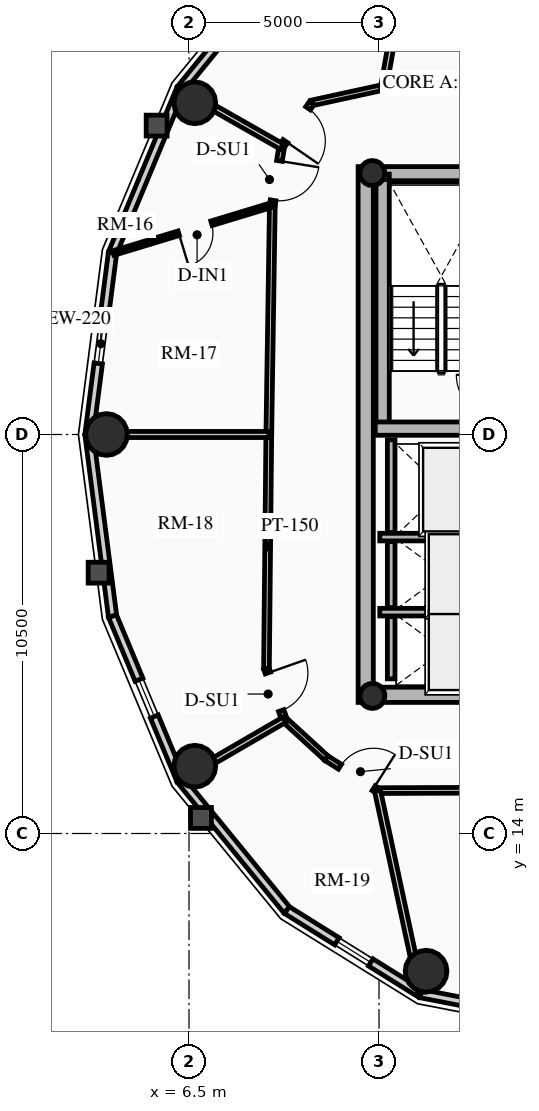
"""IFC4 building model, lengths in metres.
Left out: names, types, materials, properties, quantities, classifications, styles, units other than length and angle.
Written with IfcOpenShell. Run it as: python <this file> out.ifc"""

import sys

from ifc_helpers import new_model, si_unit, direction, frame, frame_2d, origin, origin_2d, place, context, subcontext, project, spatial, rectangle, circle, hollow_circle, extrude, source, transform, mapped, element, fill, save


model = new_model("IFC4")
c1 = context("Model", 3, precision=1e-05, world=origin(), true_north=direction((0.0, 1.0)))
c2 = subcontext(c1, "Body", "Model", "MODEL_VIEW")
j1 = project(units=[si_unit("LENGTHUNIT", "METRE"), si_unit("PLANEANGLEUNIT", "RADIAN")], contexts=[c1])
p1 = place(None, origin())
s1 = spatial("IfcSite", under=j1, at=p1, CompositionType="ELEMENT")
p2 = place(p1, origin())
s2 = spatial("IfcBuilding", under=s1, at=p2, CompositionType="ELEMENT")
p3 = place(p2, frame((0.0, 0.0, 205.39)))
s3 = spatial("IfcBuildingStorey", under=s2, at=p3, CompositionType="ELEMENT", Elevation=205.39)
p4 = place(p3, frame((11.15, 17.45, 0.0), z_axis=(0.0, 0.0, 1.0), x_axis=(0.0, 1.0, 0.0)))
e1 = element("IfcWall", 1, at=p4, inside=s3, PredefinedType="SHEAR", context=c2, shape_type="SweptSolid", body=[
    extrude(rectangle(XDim=14.1, YDim=0.4, at=frame_2d((7.05, 0.0))), origin(), (0.0, 0.0, 1.0), 2.91),
])
p5 = place(p3, frame((11.15, 17.65, 0.0), z_axis=(0.0, 0.0, 1.0), x_axis=(1.0, 0.0, 0.0)))
e2 = element("IfcWall", 2, at=p5, inside=s3, PredefinedType="SHEAR", context=c2, shape_type="SweptSolid", body=[
    extrude(rectangle(XDim=10.7, YDim=0.4, at=frame_2d((5.35, 0.0))), origin(), (0.0, 0.0, 1.0), 2.91),
])
m1 = source(origin(), c2, "Body", "SweptSolid", [
    extrude(rectangle(XDim=1.5, YDim=2.02, at=frame_2d((0.75, 1.01))), frame((0.0, 0.21, 0.0), z_axis=(0.0, -1.0, 0.0), x_axis=(1.0, 0.0, 0.0)), (0.0, 0.0, 1.0), 0.42),
])
p6 = place(p5, frame((5.45, 0.0, 0.0)))
e3 = element("IfcOpeningElement", 3, at=p6, cuts=e2, PredefinedType="OPENING", context=c2, shape_type="MappedRepresentation", body=[
    mapped(m1, transform((0.0, 0.0, 0.0), x_axis=(1.0, 0.0, 0.0), y_axis=(0.0, 1.0, 0.0), z_axis=(0.0, 0.0, 1.0), scale=1.0)),
])
p7 = place(p3, frame((11.15, 31.35, 0.0), z_axis=(0.0, 0.0, 1.0), x_axis=(1.0, 0.0, 0.0)))
e4 = element("IfcWall", 4, at=p7, inside=s3, PredefinedType="SHEAR", context=c2, shape_type="SweptSolid", body=[
    extrude(rectangle(XDim=10.7, YDim=0.4, at=frame_2d((5.35, 0.0))), origin(), (0.0, 0.0, 1.0), 2.91),
])
p8 = place(p7, frame((4.6, 0.0, 0.0)))
e5 = element("IfcOpeningElement", 5, at=p8, cuts=e4, PredefinedType="OPENING", context=c2, shape_type="MappedRepresentation", body=[
    mapped(m1, transform((0.0, 0.0, 0.0), x_axis=(1.0, 0.0, 0.0), y_axis=(0.0, 1.0, 0.0), z_axis=(0.0, 0.0, 1.0), scale=1.0)),
])
p9 = place(p3, frame((11.595, 24.655, 0.0), z_axis=(0.0, 0.0, 1.0), x_axis=(0.0, 1.0, 0.0)))
e6 = element("IfcWall", 6, at=p9, inside=s3, PredefinedType="SHEAR", context=c2, shape_type="SweptSolid", body=[
    extrude(rectangle(XDim=6.695, YDim=0.35, at=frame_2d((3.348, 0.0))), origin(), (0.0, 0.0, 1.0), 2.91),
])
p10 = place(p3, frame((11.4, 24.655, 0.0), z_axis=(0.0, 0.0, 1.0), x_axis=(1.0, 0.0, 0.0)))
e7 = element("IfcWall", 7, at=p10, inside=s3, PredefinedType="SHEAR", context=c2, shape_type="SweptSolid", body=[
    extrude(rectangle(XDim=3.285, YDim=0.35, at=frame_2d((1.643, 0.0))), origin(), (0.0, 0.0, 1.0), 2.91),
])
for number, where, z_axis, x_axis in (
    (8, (11.325, 17.62, 0.0), (0.0, 0.0, 1.0), (1.0, 0.0, 0.0)),
    (9, (11.325, 31.38, 0.0), (0.0, 0.0, 1.0), (1.0, 0.0, 0.0)),
):
    element("IfcColumn", number, at=place(p3, frame(where, z_axis=z_axis, x_axis=x_axis)), inside=s3, PredefinedType="COLUMN", context=c2, shape_type="SweptSolid", body=[
        extrude(hollow_circle(Radius=0.33, WallThickness=0.025, at=origin_2d()), origin(), (0.0, 0.0, 1.0), 2.91),
    ])
for number, where, z_axis, x_axis in (
    (10, (6.653, 33.229, 0.0), (0.0, 0.0, 1.0), (1.0, 0.0, 0.0)),
    (11, (4.328, 24.5, 0.0), (0.0, 0.0, 1.0), (1.0, 0.0, 0.0)),
    (12, (6.653, 15.771, 0.0), (0.0, 0.0, 1.0), (1.0, 0.0, 0.0)),
    (13, (12.739, 10.377, 0.0), (0.0, 0.0, 1.0), (1.0, 0.0, 0.0)),
):
    element("IfcColumn", number, at=place(p3, frame(where, z_axis=z_axis, x_axis=x_axis)), inside=s3, PredefinedType="USERDEFINED", context=c2, shape_type="SweptSolid", body=[
        extrude(circle(Radius=0.55, at=origin_2d()), origin(), (0.0, 0.0, 1.0), 2.91),
    ])
p11 = place(p3, frame((6.282, 33.593, 0.0), z_axis=(0.0, 0.0, 1.0), x_axis=(0.632467166636, 0.774587169483, 0.0)))
e14 = element("IfcWall", 14, at=p11, inside=s3, PredefinedType="SOLIDWALL", context=c2, shape_type="SweptSolid", body=[
    extrude(rectangle(XDim=4.418, YDim=0.22, at=frame_2d((2.209, 0.0))), origin(), (0.0, 0.0, 1.0), 2.322),
])
m2 = source(origin(), c2, "Body", "SweptSolid", [
    extrude(rectangle(XDim=1.05, YDim=1.3, at=frame_2d((0.525, 0.65))), frame((0.0, 0.12, 0.0), z_axis=(0.0, -1.0, 0.0), x_axis=(1.0, 0.0, 0.0)), (0.0, 0.0, 1.0), 0.24),
])
p12 = place(p11, frame((1.684, 0.0, 0.65)))
e15 = element("IfcOpeningElement", 15, at=p12, cuts=e14, PredefinedType="OPENING", context=c2, shape_type="MappedRepresentation", body=[
    mapped(m2, transform((0.0, 0.0, 0.0), x_axis=(1.0, 0.0, 0.0), y_axis=(0.0, 1.0, 0.0), z_axis=(0.0, 0.0, 1.0), scale=1.0)),
])
p13 = place(p3, frame((4.488, 29.281, 0.0), z_axis=(0.0, 0.0, 1.0), x_axis=(0.384036305194, 0.923317993052, 0.0)))
e16 = element("IfcWall", 16, at=p13, inside=s3, PredefinedType="SOLIDWALL", context=c2, shape_type="SweptSolid", body=[
    extrude(rectangle(XDim=4.671, YDim=0.22, at=frame_2d((2.335, 0.0))), origin(), (0.0, 0.0, 1.0), 2.322),
])
p14 = place(p3, frame((3.87, 24.5, 0.0), z_axis=(0.0, 0.0, 1.0), x_axis=(0.128241318541, 0.991742993027, 0.0)))
e17 = element("IfcWall", 17, at=p14, inside=s3, PredefinedType="SOLIDWALL", context=c2, shape_type="SweptSolid", body=[
    extrude(rectangle(XDim=4.82, YDim=0.22, at=frame_2d((2.41, 0.0))), origin(), (0.0, 0.0, 1.0), 2.322),
])
p15 = place(p14, frame((1.885, 0.0, 0.65)))
e18 = element("IfcOpeningElement", 18, at=p15, cuts=e17, PredefinedType="OPENING", context=c2, shape_type="MappedRepresentation", body=[
    mapped(m2, transform((0.0, 0.0, 0.0), x_axis=(1.0, 0.0, 0.0), y_axis=(0.0, 1.0, 0.0), z_axis=(0.0, 0.0, 1.0), scale=1.0)),
])
p16 = place(p3, frame((4.488, 19.719, 0.0), z_axis=(0.0, 0.0, 1.0), x_axis=(-0.128241318541, 0.991742993027, 0.0)))
e19 = element("IfcWall", 19, at=p16, inside=s3, PredefinedType="SOLIDWALL", context=c2, shape_type="SweptSolid", body=[
    extrude(rectangle(XDim=4.82, YDim=0.22, at=frame_2d((2.41, 0.0))), origin(), (0.0, 0.0, 1.0), 2.322),
])
p17 = place(p3, frame((6.282, 15.407, 0.0), z_axis=(0.0, 0.0, 1.0), x_axis=(-0.384036305194, 0.923317993052, 0.0)))
e20 = element("IfcWall", 20, at=p17, inside=s3, PredefinedType="SOLIDWALL", context=c2, shape_type="SweptSolid", body=[
    extrude(rectangle(XDim=4.671, YDim=0.22, at=frame_2d((2.335, 0.0))), origin(), (0.0, 0.0, 1.0), 2.322),
])
p18 = place(p17, frame((1.81, 0.0, 0.65)))
e21 = element("IfcOpeningElement", 21, at=p18, cuts=e20, PredefinedType="OPENING", context=c2, shape_type="MappedRepresentation", body=[
    mapped(m2, transform((0.0, 0.0, 0.0), x_axis=(1.0, 0.0, 0.0), y_axis=(0.0, 1.0, 0.0), z_axis=(0.0, 0.0, 1.0), scale=1.0)),
])
p19 = place(p3, frame((9.076, 11.985, 0.0), z_axis=(0.0, 0.0, 1.0), x_axis=(-0.632467166636, 0.774587169483, 0.0)))
e22 = element("IfcWall", 22, at=p19, inside=s3, PredefinedType="SOLIDWALL", context=c2, shape_type="SweptSolid", body=[
    extrude(rectangle(XDim=4.418, YDim=0.22, at=frame_2d((2.209, 0.0))), origin(), (0.0, 0.0, 1.0), 2.322),
])
p20 = place(p3, frame((12.597, 9.787, 0.0), z_axis=(0.0, 0.0, 1.0), x_axis=(-0.848318713376, 0.529485939886, 0.0)))
e23 = element("IfcWall", 23, at=p20, inside=s3, PredefinedType="SOLIDWALL", context=c2, shape_type="SweptSolid", body=[
    extrude(rectangle(XDim=4.15, YDim=0.22, at=frame_2d((2.075, 0.0))), origin(), (0.0, 0.0, 1.0), 2.322),
])
p21 = place(p20, frame((1.55, 0.0, 0.65)))
e24 = element("IfcOpeningElement", 24, at=p21, cuts=e23, PredefinedType="OPENING", context=c2, shape_type="MappedRepresentation", body=[
    mapped(m2, transform((0.0, 0.0, 0.0), x_axis=(1.0, 0.0, 0.0), y_axis=(0.0, 1.0, 0.0), z_axis=(0.0, 0.0, 1.0), scale=1.0)),
])
p22 = place(p3, frame((16.5, 9.03, 0.0), z_axis=(0.0, 0.0, 1.0), x_axis=(-0.981700307484, 0.190432419211, 0.0)))
e25 = element("IfcWall", 25, at=p22, inside=s3, PredefinedType="SOLIDWALL", context=c2, shape_type="SweptSolid", body=[
    extrude(rectangle(XDim=3.976, YDim=0.22, at=frame_2d((1.988, 0.0))), origin(), (0.0, 0.0, 1.0), 2.322),
])
p23 = place(p22, frame((1.463, 0.0, 0.65)))
e26 = element("IfcOpeningElement", 26, at=p23, cuts=e25, PredefinedType="OPENING", context=c2, shape_type="MappedRepresentation", body=[
    mapped(m2, transform((0.0, 0.0, 0.0), x_axis=(1.0, 0.0, 0.0), y_axis=(0.0, 1.0, 0.0), z_axis=(0.0, 0.0, 1.0), scale=1.0)),
])
p24 = place(p3, frame((11.52, 21.8, 0.0), z_axis=(0.0, 0.0, 1.0), x_axis=(1.0, 0.0, 0.0)))
e27 = element("IfcWall", 27, at=p24, inside=s3, PredefinedType="SHEAR", context=c2, shape_type="SweptSolid", body=[
    extrude(rectangle(XDim=2.97, YDim=0.2, at=frame_2d((1.485, 0.0))), origin(), (0.0, 0.0, 1.0), 2.91),
])
p25 = place(p3, frame((11.82, 21.92, 0.0), z_axis=(0.0, 0.0, 1.0), x_axis=(0.0, 1.0, 0.0)))
e28 = element("IfcWall", 28, at=p25, inside=s3, PredefinedType="SHEAR", context=c2, shape_type="SweptSolid", body=[
    extrude(rectangle(XDim=2.44, YDim=0.2, at=frame_2d((1.22, 0.0))), origin(), (0.0, 0.0, 1.0), 2.91),
])
p26 = place(p3, frame((11.52, 19.825, 0.0), z_axis=(0.0, 0.0, 1.0), x_axis=(1.0, 0.0, 0.0)))
e29 = element("IfcWall", 29, at=p26, inside=s3, PredefinedType="SHEAR", context=c2, shape_type="SweptSolid", body=[
    extrude(rectangle(XDim=2.97, YDim=0.2, at=frame_2d((1.485, 0.0))), origin(), (0.0, 0.0, 1.0), 2.91),
])
p27 = place(p3, frame((11.82, 19.945, 0.0), z_axis=(0.0, 0.0, 1.0), x_axis=(0.0, 1.0, 0.0)))
e30 = element("IfcWall", 30, at=p27, inside=s3, PredefinedType="SHEAR", context=c2, shape_type="SweptSolid", body=[
    extrude(rectangle(XDim=1.735, YDim=0.2, at=frame_2d((0.867, 0.0))), origin(), (0.0, 0.0, 1.0), 2.91),
])
p28 = place(p3, frame((11.82, 18.07, 0.0), z_axis=(0.0, 0.0, 1.0), x_axis=(0.0, 1.0, 0.0)))
e31 = element("IfcWall", 31, at=p28, inside=s3, PredefinedType="SHEAR", context=c2, shape_type="SweptSolid", body=[
    extrude(rectangle(XDim=1.635, YDim=0.2, at=frame_2d((0.817, 0.0))), origin(), (0.0, 0.0, 1.0), 2.91),
])
p29 = place(p3, frame((18.143, 33.86, 0.0), z_axis=(0.0, 0.0, 1.0), x_axis=(-0.999419208319, -0.034077060363, 0.0)))
e32 = element("IfcWall", 32, at=p29, inside=s3, PredefinedType="PARTITIONING", context=c2, shape_type="SweptSolid", body=[
    extrude(rectangle(XDim=6.527, YDim=0.15, at=frame_2d((3.263, 0.0))), origin(), (0.0, 0.0, 1.0), 2.255),
])
p30 = place(p3, frame((11.62, 33.637, 0.0), z_axis=(0.0, 0.0, 1.0), x_axis=(-0.97702579435, -0.213121085711, 0.0)))
e33 = element("IfcWall", 33, at=p30, inside=s3, PredefinedType="PARTITIONING", context=c2, shape_type="SweptSolid", body=[
    extrude(rectangle(XDim=1.935, YDim=0.15, at=frame_2d((0.967, 0.0))), origin(), (0.0, 0.0, 1.0), 2.255),
])
p31 = place(p3, frame((9.729, 33.225, 0.0), z_axis=(0.0, 0.0, 1.0), x_axis=(-0.567183649484, -0.82359134755, 0.0)))
e34 = element("IfcWall", 34, at=p31, inside=s3, PredefinedType="PARTITIONING", context=c2, shape_type="SweptSolid", body=[
    extrude(rectangle(XDim=1.392, YDim=0.15, at=frame_2d((0.696, 0.0))), origin(), (0.0, 0.0, 1.0), 2.322),
])
m3 = source(origin(), c2, "Body", "SweptSolid", [
    extrude(rectangle(XDim=1.05, YDim=2.015, at=frame_2d((0.525, 1.007))), frame((0.0, 0.085, 0.0), z_axis=(0.0, -1.0, 0.0), x_axis=(1.0, 0.0, 0.0)), (0.0, 0.0, 1.0), 0.17),
])
p32 = place(p31, frame((0.171, 0.0, 0.0)))
e35 = element("IfcOpeningElement", 35, at=p32, cuts=e34, PredefinedType="OPENING", context=c2, shape_type="MappedRepresentation", body=[
    mapped(m3, transform((0.0, 0.0, 0.0), x_axis=(1.0, 0.0, 0.0), y_axis=(0.0, 1.0, 0.0), z_axis=(0.0, 0.0, 1.0), scale=1.0)),
])
p33 = place(p3, frame((8.94, 32.078, 0.0), z_axis=(0.0, 0.0, 1.0), x_axis=(-0.159148467753, -0.98725466077, 0.0)))
e36 = element("IfcWall", 36, at=p33, inside=s3, PredefinedType="PARTITIONING", context=c2, shape_type="SweptSolid", body=[
    extrude(rectangle(XDim=1.554, YDim=0.15, at=frame_2d((0.777, 0.0))), origin(), (0.0, 0.0, 1.0), 2.255),
])
p34 = place(p33, frame((0.384, 0.0, 0.0)))
e37 = element("IfcOpeningElement", 37, at=p34, cuts=e36, PredefinedType="OPENING", context=c2, shape_type="MappedRepresentation", body=[
    mapped(m3, transform((0.0, 0.0, 0.0), x_axis=(1.0, 0.0, 0.0), y_axis=(0.0, 1.0, 0.0), z_axis=(0.0, 0.0, 1.0), scale=1.0)),
])
p35 = place(p3, frame((8.693, 30.544, 0.0), z_axis=(0.0, 0.0, 1.0), x_axis=(-0.015307007986, -0.99988284089, 0.0)))
e38 = element("IfcWall", 38, at=p35, inside=s3, PredefinedType="PARTITIONING", context=c2, shape_type="SweptSolid", body=[
    extrude(rectangle(XDim=6.045, YDim=0.15, at=frame_2d((3.022, 0.0))), origin(), (0.0, 0.0, 1.0), 2.255),
])
p36 = place(p3, frame((8.6, 24.5, 0.0), z_axis=(0.0, 0.0, 1.0), x_axis=(-0.010023665349, -0.999949761805, 0.0)))
e39 = element("IfcWall", 39, at=p36, inside=s3, PredefinedType="PARTITIONING", context=c2, shape_type="SweptSolid", body=[
    extrude(rectangle(XDim=6.162, YDim=0.15, at=frame_2d((3.081, 0.0))), origin(), (0.0, 0.0, 1.0), 2.255),
])
p37 = place(p3, frame((8.538, 18.338, 0.0), z_axis=(0.0, 0.0, 1.0), x_axis=(0.331358150167, -0.94350504838, 0.0)))
e40 = element("IfcWall", 40, at=p37, inside=s3, PredefinedType="PARTITIONING", context=c2, shape_type="SweptSolid", body=[
    extrude(rectangle(XDim=1.424, YDim=0.15, at=frame_2d((0.712, 0.0))), origin(), (0.0, 0.0, 1.0), 2.255),
])
p38 = place(p37, frame((0.12, 0.0, 0.0)))
e41 = element("IfcOpeningElement", 41, at=p38, cuts=e40, PredefinedType="OPENING", context=c2, shape_type="MappedRepresentation", body=[
    mapped(m3, transform((0.0, 0.0, 0.0), x_axis=(1.0, 0.0, 0.0), y_axis=(0.0, 1.0, 0.0), z_axis=(0.0, 0.0, 1.0), scale=1.0)),
])
p39 = place(p3, frame((9.01, 16.994, 0.0), z_axis=(0.0, 0.0, 1.0), x_axis=(0.737701798986, -0.67512669609, 0.0)))
e42 = element("IfcWall", 42, at=p39, inside=s3, PredefinedType="PARTITIONING", context=c2, shape_type="SweptSolid", body=[
    extrude(rectangle(XDim=1.498, YDim=0.15, at=frame_2d((0.749, 0.0))), origin(), (0.0, 0.0, 1.0), 2.322),
])
p40 = place(p3, frame((10.115, 15.983, 0.0), z_axis=(0.0, 0.0, 1.0), x_axis=(0.843995849351, -0.536349705209, 0.0)))
e43 = element("IfcWall", 43, at=p40, inside=s3, PredefinedType="PARTITIONING", context=c2, shape_type="SweptSolid", body=[
    extrude(rectangle(XDim=1.593, YDim=0.15, at=frame_2d((0.796, 0.0))), origin(), (0.0, 0.0, 1.0), 2.255),
])
p41 = place(p40, frame((0.423, 0.0, 0.0)))
e44 = element("IfcOpeningElement", 44, at=p41, cuts=e43, PredefinedType="OPENING", context=c2, shape_type="MappedRepresentation", body=[
    mapped(m3, transform((0.0, 0.0, 0.0), x_axis=(1.0, 0.0, 0.0), y_axis=(0.0, 1.0, 0.0), z_axis=(0.0, 0.0, 1.0), scale=1.0)),
])
p42 = place(p3, frame((11.46, 15.129, 0.0), z_axis=(0.0, 0.0, 1.0), x_axis=(0.999993513287, 0.003601858435, 0.0)))
e45 = element("IfcWall", 45, at=p42, inside=s3, PredefinedType="PARTITIONING", context=c2, shape_type="SweptSolid", body=[
    extrude(rectangle(XDim=3.321, YDim=0.15, at=frame_2d((1.661, 0.0))), origin(), (0.0, 0.0, 1.0), 2.322),
])
p43 = place(p3, frame((11.62, 33.637, 0.0), z_axis=(0.0, 0.0, 1.0), x_axis=(0.174269061361, 0.984698072636, 0.0)))
e46 = element("IfcWall", 46, at=p43, inside=s3, PredefinedType="PARTITIONING", context=c2, shape_type="SweptSolid", body=[
    extrude(rectangle(XDim=5.643, YDim=0.16, at=frame_2d((2.822, 0.0))), origin(), (0.0, 0.0, 1.0), 2.322),
])
p44 = place(p3, frame((8.94, 32.078, 0.0), z_axis=(0.0, 0.0, 1.0), x_axis=(-0.869170975588, 0.494511693689, 0.0)))
e47 = element("IfcWall", 47, at=p44, inside=s3, PredefinedType="PARTITIONING", context=c2, shape_type="SweptSolid", body=[
    extrude(rectangle(XDim=3.039, YDim=0.16, at=frame_2d((1.52, 0.0))), origin(), (0.0, 0.0, 1.0), 2.322),
])
p45 = place(p3, frame((8.6, 24.5, 0.0), z_axis=(0.0, 0.0, 1.0), x_axis=(-1.0, 0.0, 0.0)))
e48 = element("IfcWall", 48, at=p45, inside=s3, PredefinedType="PARTITIONING", context=c2, shape_type="SweptSolid", body=[
    extrude(rectangle(XDim=4.71, YDim=0.16, at=frame_2d((2.355, 0.0))), origin(), (0.0, 0.0, 1.0), 2.322),
])
p46 = place(p3, frame((9.01, 16.994, 0.0), z_axis=(0.0, 0.0, 1.0), x_axis=(-0.864647164532, -0.502379618283, 0.0)))
e49 = element("IfcWall", 49, at=p46, inside=s3, PredefinedType="PARTITIONING", context=c2, shape_type="SweptSolid", body=[
    extrude(rectangle(XDim=3.136, YDim=0.16, at=frame_2d((1.568, 0.0))), origin(), (0.0, 0.0, 1.0), 2.322),
])
p47 = place(p3, frame((11.46, 15.129, 0.0), z_axis=(0.0, 0.0, 1.0), x_axis=(0.210058897642, -0.977688733453, 0.0)))
e50 = element("IfcWall", 50, at=p47, inside=s3, PredefinedType="PARTITIONING", context=c2, shape_type="SweptSolid", body=[
    extrude(rectangle(XDim=5.444, YDim=0.16, at=frame_2d((2.722, 0.0))), origin(), (0.0, 0.0, 1.0), 2.322),
])
p48 = place(p3, frame((8.693, 30.544, 0.0), z_axis=(0.0, 0.0, 1.0), x_axis=(-0.956933754187, -0.290306372814, 0.0)))
e51 = element("IfcWall", 51, at=p48, inside=s3, PredefinedType="PARTITIONING", context=c2, shape_type="SweptSolid", body=[
    extrude(rectangle(XDim=4.374, YDim=0.125, at=frame_2d((2.187, 0.0))), origin(), (0.0, 0.0, 1.0), 2.255),
])
m4 = source(origin(), c2, "Body", "SweptSolid", [
    extrude(rectangle(XDim=0.9, YDim=2.005, at=frame_2d((0.45, 1.002))), frame((0.0, 0.073, 0.0), z_axis=(0.0, -1.0, 0.0), x_axis=(1.0, 0.0, 0.0)), (0.0, 0.0, 1.0), 0.145),
])
p49 = place(p48, frame((1.674, 0.0, 0.0)))
e52 = element("IfcOpeningElement", 52, at=p49, cuts=e51, PredefinedType="OPENING", context=c2, shape_type="MappedRepresentation", body=[
    mapped(m4, transform((0.0, 0.0, 0.0), x_axis=(1.0, 0.0, 0.0), y_axis=(0.0, 1.0, 0.0), z_axis=(0.0, 0.0, 1.0), scale=1.0)),
])
m5 = source(origin(), c2, "Body", "SweptSolid", [
    extrude(rectangle(XDim=1.05, YDim=1.3, at=frame_2d((0.525, 0.65))), frame((0.0, 0.03, 0.0), z_axis=(0.0, -1.0, 0.0), x_axis=(1.0, 0.0, 0.0)), (0.0, 0.0, 1.0), 0.06),
])
p50 = place(p15, origin())
e53 = element("IfcWindow", 53, at=p50, inside=s3, PartitioningType="SINGLE_PANEL", PredefinedType="WINDOW", context=c2, shape_type="MappedRepresentation", body=[
    mapped(m5, transform((0.0, 0.0, 0.0), x_axis=(1.0, 0.0, 0.0), y_axis=(0.0, 1.0, 0.0), z_axis=(0.0, 0.0, 1.0), scale=1.0)),
])
fill(e18, e53)
p51 = place(p18, origin())
e54 = element("IfcWindow", 54, at=p51, inside=s3, PartitioningType="SINGLE_PANEL", PredefinedType="WINDOW", context=c2, shape_type="MappedRepresentation", body=[
    mapped(m5, transform((0.0, 0.0, 0.0), x_axis=(1.0, 0.0, 0.0), y_axis=(0.0, 1.0, 0.0), z_axis=(0.0, 0.0, 1.0), scale=1.0)),
])
fill(e21, e54)
p52 = place(p21, origin())
e55 = element("IfcWindow", 55, at=p52, inside=s3, PartitioningType="SINGLE_PANEL", PredefinedType="WINDOW", context=c2, shape_type="MappedRepresentation", body=[
    mapped(m5, transform((0.0, 0.0, 0.0), x_axis=(1.0, 0.0, 0.0), y_axis=(0.0, 1.0, 0.0), z_axis=(0.0, 0.0, 1.0), scale=1.0)),
])
fill(e24, e55)
m6 = source(origin(), c2, "Body", "SweptSolid", [
    extrude(rectangle(XDim=1.05, YDim=2.015, at=frame_2d((0.525, 1.007))), frame((0.0, 0.025, 0.0), z_axis=(0.0, -1.0, 0.0), x_axis=(1.0, 0.0, 0.0)), (0.0, 0.0, 1.0), 0.05),
])
p53 = place(p32, origin())
e56 = element("IfcDoor", 56, at=p53, inside=s3, OperationType="SINGLE_SWING_RIGHT", PredefinedType="DOOR", context=c2, shape_type="MappedRepresentation", body=[
    mapped(m6, transform((0.0, 0.0, 0.0), x_axis=(1.0, 0.0, 0.0), y_axis=(0.0, 1.0, 0.0), z_axis=(0.0, 0.0, 1.0), scale=1.0)),
])
fill(e35, e56)
p54 = place(p34, origin())
e57 = element("IfcDoor", 57, at=p54, inside=s3, OperationType="SINGLE_SWING_LEFT", PredefinedType="DOOR", context=c2, shape_type="MappedRepresentation", body=[
    mapped(m6, transform((0.0, 0.0, 0.0), x_axis=(1.0, 0.0, 0.0), y_axis=(0.0, 1.0, 0.0), z_axis=(0.0, 0.0, 1.0), scale=1.0)),
])
fill(e37, e57)
m7 = source(origin(), c2, "Body", "SweptSolid", [
    extrude(rectangle(XDim=0.9, YDim=2.005, at=frame_2d((0.45, 1.002))), frame((0.0, 0.025, 0.0), z_axis=(0.0, -1.0, 0.0), x_axis=(1.0, 0.0, 0.0)), (0.0, 0.0, 1.0), 0.05),
])
p55 = place(p49, origin())
e58 = element("IfcDoor", 58, at=p55, inside=s3, OperationType="SINGLE_SWING_RIGHT", PredefinedType="DOOR", context=c2, shape_type="MappedRepresentation", body=[
    mapped(m7, transform((0.0, 0.0, 0.0), x_axis=(1.0, 0.0, 0.0), y_axis=(0.0, 1.0, 0.0), z_axis=(0.0, 0.0, 1.0), scale=1.0)),
])
fill(e52, e58)
p56 = place(p38, origin())
e59 = element("IfcDoor", 59, at=p56, inside=s3, OperationType="SINGLE_SWING_LEFT", PredefinedType="DOOR", context=c2, shape_type="MappedRepresentation", body=[
    mapped(m6, transform((0.0, 0.0, 0.0), x_axis=(1.0, 0.0, 0.0), y_axis=(0.0, 1.0, 0.0), z_axis=(0.0, 0.0, 1.0), scale=1.0)),
])
fill(e41, e59)
p57 = place(p41, origin())
e60 = element("IfcDoor", 60, at=p57, inside=s3, OperationType="SINGLE_SWING_RIGHT", PredefinedType="DOOR", context=c2, shape_type="MappedRepresentation", body=[
    mapped(m6, transform((0.0, 0.0, 0.0), x_axis=(1.0, 0.0, 0.0), y_axis=(0.0, 1.0, 0.0), z_axis=(0.0, 0.0, 1.0), scale=1.0)),
])
fill(e44, e60)
save(model, sys.argv[1])
